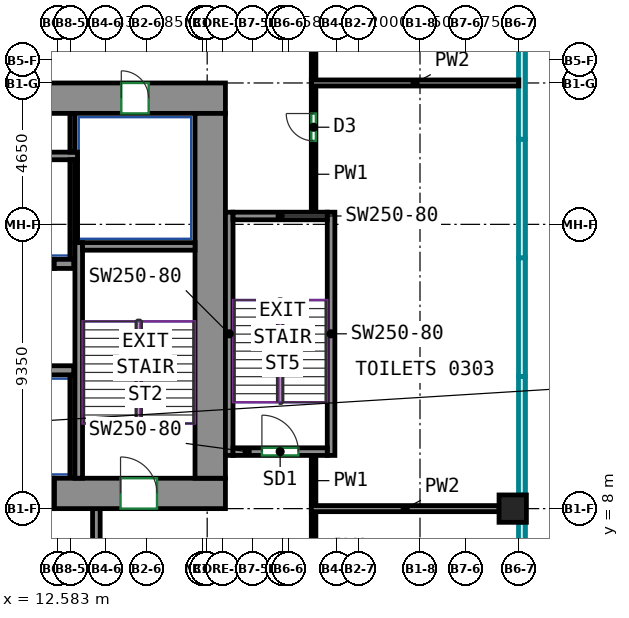
"""IFC4 building model, lengths in metres.
Left out: names, types, materials, properties, quantities, classifications, styles, units other than length and angle.
Written with IfcOpenShell. Run it as: python <this file> out.ifc"""

import sys

from ifc_helpers import new_model, si_unit, direction, frame, frame_2d, origin, origin_2d, place, context, subcontext, project, spatial, rectangle, extrude, source, transform, mapped, element, fill, save


model = new_model("IFC4")
c1 = context("Model", 3, precision=1e-05, world=origin(), true_north=direction((0.0, 1.0)))
c2 = subcontext(c1, "Body", "Model", "MODEL_VIEW")
j1 = project(units=[si_unit("LENGTHUNIT", "METRE"), si_unit("PLANEANGLEUNIT", "RADIAN")], contexts=[c1])
p1 = place(None, origin())
s1 = spatial("IfcSite", under=j1, at=p1, CompositionType="ELEMENT")
p2 = place(p1, origin())
s2 = spatial("IfcBuilding", under=s1, at=p2, CompositionType="ELEMENT")
p3 = place(p2, frame((0.0, 0.0, 18.0)))
s3 = spatial("IfcBuildingStorey", under=s2, at=p3, CompositionType="ELEMENT", Elevation=18.0)
m1 = source(origin(), c2, "Body", "SweptSolid", [
    extrude(rectangle(XDim=0.9, YDim=0.9, at=origin_2d()), origin(), (0.0, 0.0, 1.0), 4.1),
])
p4 = place(p3, frame((27.55, 8.0, 0.0), z_axis=(0.0, 0.0, 1.0), x_axis=(1.0, 0.0, 0.0)))
e1 = element("IfcColumn", 1, at=p4, inside=s3, PredefinedType="COLUMN", context=c2, shape_type="MappedRepresentation", body=[
    mapped(m1, transform((0.0, 0.0, 0.0))),
])
m2 = source(origin(), c2, "Body", "SweptSolid", [
    extrude(rectangle(XDim=5.63, YDim=1.0, at=frame_2d((2.815, 0.0))), origin(), (0.0, 0.0, 1.0), 4.1),
])
p5 = place(p3, frame((12.47, 8.5, 0.0), z_axis=(0.0, 0.0, 1.0), x_axis=(1.0, 0.0, 0.0)))
e2 = element("IfcWall", 2, at=p5, inside=s3, PredefinedType="SHEAR", context=c2, shape_type="MappedRepresentation", body=[
    mapped(m2, transform((0.0, 0.0, 0.0))),
])
p6 = place(p5, frame((2.18, 0.0, 0.0)))
e3 = element("IfcOpeningElement", 3, at=p6, cuts=e2, PredefinedType="OPENING", context=c2, shape_type="SweptSolid", body=[
    extrude(rectangle(XDim=1.2, YDim=2.1, at=frame_2d((0.6, 1.05))), frame((0.0, 0.51, 0.0), z_axis=(0.0, -1.0, 0.0), x_axis=(1.0, 0.0, 0.0)), (0.0, 0.0, 1.0), 1.02),
])
m3 = source(origin(), c2, "Body", "SweptSolid", [
    extrude(rectangle(XDim=34.1, YDim=1.0, at=frame_2d((17.05, 0.0))), origin(), (0.0, 0.0, 1.0), 4.1),
])
p7 = place(p3, frame((-16.0, 21.5, 0.0), z_axis=(0.0, 0.0, 1.0), x_axis=(1.0, 0.0, 0.0)))
e4 = element("IfcWall", 4, at=p7, inside=s3, PredefinedType="SHEAR", context=c2, shape_type="MappedRepresentation", body=[
    mapped(m3, transform((0.0, 0.0, 0.0))),
])
p8 = place(p7, frame((8.52, 0.0, 0.0)))
e5 = element("IfcOpeningElement", 5, at=p8, cuts=e4, PredefinedType="OPENING", context=c2, shape_type="SweptSolid", body=[
    extrude(rectangle(XDim=0.9, YDim=2.1, at=frame_2d((0.45, 1.05))), frame((0.0, 0.51, 0.0), z_axis=(0.0, -1.0, 0.0), x_axis=(1.0, 0.0, 0.0)), (0.0, 0.0, 1.0), 1.02),
])
p9 = place(p7, frame((14.55, 0.0, 0.0)))
e6 = element("IfcOpeningElement", 6, at=p9, cuts=e4, PredefinedType="OPENING", context=c2, shape_type="SweptSolid", body=[
    extrude(rectangle(XDim=0.9, YDim=2.1, at=frame_2d((0.45, 1.05))), frame((0.0, 0.51, 0.0), z_axis=(0.0, -1.0, 0.0), x_axis=(1.0, 0.0, 0.0)), (0.0, 0.0, 1.0), 1.02),
])
p10 = place(p7, frame((19.374, 0.0, 0.0)))
e7 = element("IfcOpeningElement", 7, at=p10, cuts=e4, PredefinedType="OPENING", context=c2, shape_type="SweptSolid", body=[
    extrude(rectangle(XDim=0.9, YDim=2.1, at=frame_2d((0.45, 1.05))), frame((0.0, 0.51, 0.0), z_axis=(0.0, -1.0, 0.0), x_axis=(1.0, 0.0, 0.0)), (0.0, 0.0, 1.0), 1.02),
])
p11 = place(p7, frame((25.404, 0.0, 0.0)))
e8 = element("IfcOpeningElement", 8, at=p11, cuts=e4, PredefinedType="OPENING", context=c2, shape_type="SweptSolid", body=[
    extrude(rectangle(XDim=0.9, YDim=2.1, at=frame_2d((0.45, 1.05))), frame((0.0, 0.51, 0.0), z_axis=(0.0, -1.0, 0.0), x_axis=(1.0, 0.0, 0.0)), (0.0, 0.0, 1.0), 1.02),
])
p12 = place(p7, frame((2.525, 0.0, 0.0)))
e9 = element("IfcOpeningElement", 9, at=p12, cuts=e4, PredefinedType="OPENING", context=c2, shape_type="SweptSolid", body=[
    extrude(rectangle(XDim=0.9, YDim=2.1, at=frame_2d((0.45, 1.05))), frame((0.0, 0.51, 0.0), z_axis=(0.0, -1.0, 0.0), x_axis=(1.0, 0.0, 0.0)), (0.0, 0.0, 1.0), 1.02),
])
p13 = place(p7, frame((30.675, 0.0, 0.0)))
e10 = element("IfcOpeningElement", 10, at=p13, cuts=e4, PredefinedType="OPENING", context=c2, shape_type="SweptSolid", body=[
    extrude(rectangle(XDim=0.9, YDim=2.1, at=frame_2d((0.45, 1.05))), frame((0.0, 0.51, 0.0), z_axis=(0.0, -1.0, 0.0), x_axis=(1.0, 0.0, 0.0)), (0.0, 0.0, 1.0), 1.02),
])
m4 = source(origin(), c2, "Body", "SweptSolid", [
    extrude(rectangle(XDim=12.0, YDim=1.0, at=frame_2d((6.0, 0.0))), origin(), (0.0, 0.0, 1.0), 4.1),
])
p14 = place(p3, frame((17.6, 9.0, 0.0), z_axis=(0.0, 0.0, 1.0), x_axis=(0.0, 1.0, 0.0)))
e11 = element("IfcWall", 11, at=p14, inside=s3, PredefinedType="SHEAR", context=c2, shape_type="MappedRepresentation", body=[
    mapped(m4, transform((0.0, 0.0, 0.0))),
])
m5 = source(origin(), c2, "Body", "SweptSolid", [
    extrude(rectangle(XDim=7.75, YDim=0.25, at=frame_2d((3.875, 0.0))), origin(), (0.0, 0.0, 1.0), 4.1),
])
p15 = place(p3, frame((13.275, 9.0, 0.0), z_axis=(0.0, 0.0, 1.0), x_axis=(0.0, 1.0, 0.0)))
e12 = element("IfcWall", 12, at=p15, inside=s3, PredefinedType="SHEAR", context=c2, shape_type="MappedRepresentation", body=[
    mapped(m5, transform((0.0, 0.0, 0.0))),
])
m6 = source(origin(), c2, "Body", "SweptSolid", [
    extrude(rectangle(XDim=3.7, YDim=0.25, at=frame_2d((1.85, 0.0))), origin(), (0.0, 0.0, 1.0), 4.1),
])
p16 = place(p3, frame((13.4, 16.625, 0.0), z_axis=(0.0, 0.0, 1.0), x_axis=(1.0, 0.0, 0.0)))
e13 = element("IfcWall", 13, at=p16, inside=s3, PredefinedType="SHEAR", context=c2, shape_type="MappedRepresentation", body=[
    mapped(m6, transform((0.0, 0.0, 0.0))),
])
m7 = source(origin(), c2, "Body", "SweptSolid", [
    extrude(rectangle(XDim=8.0, YDim=0.25, at=frame_2d((4.0, 0.0))), origin(), (0.0, 0.0, 1.0), 4.1),
])
for number, where, z_axis, x_axis in (
    (14, (18.225, 9.75, 0.0), (0.0, 0.0, 1.0), (0.0, 1.0, 0.0)),
    (15, (21.575, 9.75, 0.0), (0.0, 0.0, 1.0), (0.0, 1.0, 0.0)),
):
    element("IfcWall", number, at=place(p3, frame(where, z_axis=z_axis, x_axis=x_axis)), inside=s3, PredefinedType="SHEAR", context=c2, shape_type="MappedRepresentation", body=[
        mapped(m7, transform((0.0, 0.0, 0.0))),
    ])
m8 = source(origin(), c2, "Body", "SweptSolid", [
    extrude(rectangle(XDim=3.1, YDim=0.25, at=frame_2d((1.55, 0.0))), origin(), (0.0, 0.0, 1.0), 4.1),
])
p17 = place(p3, frame((18.35, 9.875, 0.0), z_axis=(0.0, 0.0, 1.0), x_axis=(1.0, 0.0, 0.0)))
e16 = element("IfcWall", 16, at=p17, inside=s3, PredefinedType="SHEAR", context=c2, shape_type="MappedRepresentation", body=[
    mapped(m8, transform((0.0, 0.0, 0.0))),
])
p18 = place(p17, frame((0.95, 0.0, 0.0)))
e17 = element("IfcOpeningElement", 17, at=p18, cuts=e16, PredefinedType="OPENING", context=c2, shape_type="SweptSolid", body=[
    extrude(rectangle(XDim=1.2, YDim=2.1, at=frame_2d((0.6, 1.05))), frame((0.0, 0.135, 0.0), z_axis=(0.0, -1.0, 0.0), x_axis=(1.0, 0.0, 0.0)), (0.0, 0.0, 1.0), 0.27),
])
p19 = place(p3, frame((18.35, 17.625, 0.0), z_axis=(0.0, 0.0, 1.0), x_axis=(1.0, 0.0, 0.0)))
e18 = element("IfcWall", 18, at=p19, inside=s3, PredefinedType="SHEAR", context=c2, shape_type="MappedRepresentation", body=[
    mapped(m8, transform((0.0, 0.0, 0.0))),
])
m9 = source(origin(), c2, "Body", "SweptSolid", [
    extrude(rectangle(XDim=2.82, YDim=0.3, at=frame_2d((1.41, 0.0))), origin(), (0.0, 0.0, 1.0), 4.1),
])
p20 = place(p3, frame((10.29, 12.55, 0.0), z_axis=(0.0, 0.0, 1.0), x_axis=(1.0, 0.0, 0.0)))
e19 = element("IfcWall", 19, at=p20, inside=s3, PredefinedType="SHEAR", context=c2, shape_type="MappedRepresentation", body=[
    mapped(m9, transform((0.0, 0.0, 0.0))),
])
m10 = source(origin(), c2, "Body", "SweptSolid", [
    extrude(rectangle(XDim=0.64, YDim=0.3, at=frame_2d((0.32, 0.0))), origin(), (0.0, 0.0, 1.0), 4.1),
])
p21 = place(p3, frame((12.47, 16.05, 0.0), z_axis=(0.0, 0.0, 1.0), x_axis=(1.0, 0.0, 0.0)))
e20 = element("IfcWall", 20, at=p21, inside=s3, PredefinedType="SHEAR", context=c2, shape_type="MappedRepresentation", body=[
    mapped(m10, transform((0.0, 0.0, 0.0))),
])
m11 = source(origin(), c2, "Body", "SweptSolid", [
    extrude(rectangle(XDim=1.4, YDim=0.3, at=frame_2d((0.7, 0.0))), origin(), (0.0, 0.0, 1.0), 4.1),
])
p22 = place(p3, frame((11.07, 16.05, 0.0), z_axis=(0.0, 0.0, 1.0), x_axis=(1.0, 0.0, 0.0)))
e21 = element("IfcWall", 21, at=p22, inside=s3, PredefinedType="PARTITIONING", context=c2, shape_type="MappedRepresentation", body=[
    mapped(m11, transform((0.0, 0.0, 0.0))),
])
p23 = place(p22, frame((0.15, 0.0, 0.0)))
e22 = element("IfcOpeningElement", 22, at=p23, cuts=e21, PredefinedType="OPENING", context=c2, shape_type="SweptSolid", body=[
    extrude(rectangle(XDim=1.1, YDim=2.1, at=frame_2d((0.55, 1.05))), frame((0.0, 0.16, 0.0), z_axis=(0.0, -1.0, 0.0), x_axis=(1.0, 0.0, 0.0)), (0.0, 0.0, 1.0), 0.32),
])
m12 = source(origin(), c2, "Body", "SweptSolid", [
    extrude(rectangle(XDim=2.65, YDim=0.25, at=frame_2d((1.325, 0.0))), origin(), (0.0, 0.0, 1.0), 4.1),
])
p24 = place(p3, frame((13.855, 5.35, 0.0), z_axis=(0.0, 0.0, 1.0), x_axis=(0.0, 1.0, 0.0)))
e23 = element("IfcWall", 23, at=p24, inside=s3, PredefinedType="PARTITIONING", context=c2, shape_type="MappedRepresentation", body=[
    mapped(m12, transform((0.0, 0.0, 0.0))),
])
m13 = source(origin(), c2, "Body", "SweptSolid", [
    extrude(rectangle(XDim=24.37, YDim=0.25, at=frame_2d((12.185, 0.0))), origin(), (0.0, 0.0, 1.0), 4.1),
])
p25 = place(p3, frame((-11.135, 19.6, 0.0), z_axis=(0.0, 0.0, 1.0), x_axis=(1.0, 0.0, 0.0)))
e24 = element("IfcWall", 24, at=p25, inside=s3, PredefinedType="PARTITIONING", context=c2, shape_type="MappedRepresentation", body=[
    mapped(m13, transform((0.0, 0.0, 0.0))),
])
m14 = source(origin(), c2, "Body", "SweptSolid", [
    extrude(rectangle(XDim=3.275, YDim=0.165, at=frame_2d((1.638, 0.0))), origin(), (0.0, 0.0, 1.0), 4.1),
])
p26 = place(p3, frame((13.067, 16.2, 0.0), z_axis=(0.0, 0.0, 1.0), x_axis=(0.0, 1.0, 0.0)))
e25 = element("IfcWall", 25, at=p26, inside=s3, PredefinedType="PARTITIONING", context=c2, shape_type="MappedRepresentation", body=[
    mapped(m14, transform((0.0, 0.0, 0.0))),
])
m15 = source(origin(), c2, "Body", "SweptSolid", [
    extrude(rectangle(XDim=1.275, YDim=0.165, at=frame_2d((0.637, 0.0))), origin(), (0.0, 0.0, 1.0), 4.1),
])
p27 = place(p3, frame((13.067, 19.725, 0.0), z_axis=(0.0, 0.0, 1.0), x_axis=(0.0, 1.0, 0.0)))
e26 = element("IfcWall", 26, at=p27, inside=s3, PredefinedType="PARTITIONING", context=c2, shape_type="MappedRepresentation", body=[
    mapped(m15, transform((0.0, 0.0, 0.0))),
])
m16 = source(origin(), c2, "Body", "SweptSolid", [
    extrude(rectangle(XDim=2.725, YDim=0.085, at=frame_2d((1.363, 0.0))), origin(), (0.0, 0.0, 1.0), 4.1),
])
p28 = place(p3, frame((13.192, 16.75, 0.0), z_axis=(0.0, 0.0, 1.0), x_axis=(0.0, 1.0, 0.0)))
e27 = element("IfcWall", 27, at=p28, inside=s3, PredefinedType="PARTITIONING", context=c2, shape_type="MappedRepresentation", body=[
    mapped(m16, transform((0.0, 0.0, 0.0))),
])
m17 = source(origin(), c2, "Body", "SweptSolid", [
    extrude(rectangle(XDim=3.4, YDim=0.165, at=frame_2d((1.7, 0.0))), origin(), (0.0, 0.0, 1.0), 4.1),
])
p29 = place(p3, frame((13.067, 9.0, 0.0), z_axis=(0.0, 0.0, 1.0), x_axis=(0.0, 1.0, 0.0)))
e28 = element("IfcWall", 28, at=p29, inside=s3, PredefinedType="PARTITIONING", context=c2, shape_type="MappedRepresentation", body=[
    mapped(m17, transform((0.0, 0.0, 0.0))),
])
m18 = source(origin(), c2, "Body", "SweptSolid", [
    extrude(rectangle(XDim=1.4, YDim=1.0, at=frame_2d((0.7, 0.0))), origin(), (0.0, 0.0, 1.0), 2.7),
])
p30 = place(p3, frame((11.07, 8.5, 0.0), z_axis=(0.0, 0.0, 1.0), x_axis=(1.0, 0.0, 0.0)))
e29 = element("IfcWall", 29, at=p30, inside=s3, PredefinedType="PARTITIONING", context=c2, shape_type="MappedRepresentation", body=[
    mapped(m18, transform((0.0, 0.0, 0.0))),
])
p31 = place(p30, frame((0.25, 0.0, 0.0)))
e30 = element("IfcOpeningElement", 30, at=p31, cuts=e29, PredefinedType="OPENING", context=c2, shape_type="SweptSolid", body=[
    extrude(rectangle(XDim=0.9, YDim=2.1, at=frame_2d((0.45, 1.05))), frame((0.0, 0.51, 0.0), z_axis=(0.0, -1.0, 0.0), x_axis=(1.0, 0.0, 0.0)), (0.0, 0.0, 1.0), 1.02),
])
p32 = place(p3, frame((21.0, 5.6, 0.0), z_axis=(0.0, 0.0, 1.0), x_axis=(0.0, 1.0, 0.0)))
e31 = element("IfcWall", 31, at=p32, inside=s3, PredefinedType="PARTITIONING", context=c2, shape_type="SweptSolid", body=[
    extrude(rectangle(XDim=2.31, YDim=0.15, at=frame_2d((1.155, 0.0))), origin(), (0.0, 0.0, 1.0), 4.1),
])
p33 = place(p3, frame((21.0, 17.75, 0.0), z_axis=(0.0, 0.0, 1.0), x_axis=(0.0, 1.0, 0.0)))
e32 = element("IfcWall", 32, at=p33, inside=s3, PredefinedType="PARTITIONING", context=c2, shape_type="SweptSolid", body=[
    extrude(rectangle(XDim=4.16, YDim=0.15, at=frame_2d((2.08, 0.0))), origin(), (0.0, 0.0, 1.0), 4.1),
])
p34 = place(p33, frame((2.345, 0.0, 0.0)))
e33 = element("IfcOpeningElement", 33, at=p34, cuts=e32, PredefinedType="OPENING", context=c2, shape_type="SweptSolid", body=[
    extrude(rectangle(XDim=0.9, YDim=2.1, at=frame_2d((0.45, 1.05))), frame((0.0, 0.085, 0.0), z_axis=(0.0, -1.0, 0.0), x_axis=(1.0, 0.0, 0.0)), (0.0, 0.0, 1.0), 0.17),
])
p35 = place(p3, frame((21.0, 8.09, 0.0), z_axis=(0.0, 0.0, 1.0), x_axis=(0.0, 1.0, 0.0)))
e34 = element("IfcWall", 34, at=p35, inside=s3, PredefinedType="PARTITIONING", context=c2, shape_type="SweptSolid", body=[
    extrude(rectangle(XDim=1.66, YDim=0.15, at=frame_2d((0.83, 0.0))), origin(), (0.0, 0.0, 1.0), 4.1),
])
p36 = place(p3, frame((21.0, 22.09, 0.0), z_axis=(0.0, 0.0, 1.0), x_axis=(0.0, 1.0, 0.0)))
e35 = element("IfcWall", 35, at=p36, inside=s3, PredefinedType="PARTITIONING", context=c2, shape_type="SweptSolid", body=[
    extrude(rectangle(XDim=2.335, YDim=0.15, at=frame_2d((1.167, 0.0))), origin(), (0.0, 0.0, 1.0), 4.1),
])
p37 = place(p3, frame((20.926, 8.0, 0.0), z_axis=(0.0, 0.0, 1.0), x_axis=(1.0, 0.0, 0.0)))
e36 = element("IfcWall", 36, at=p37, inside=s3, PredefinedType="PARTITIONING", context=c2, shape_type="SweptSolid", body=[
    extrude(rectangle(XDim=6.174, YDim=0.2, at=frame_2d((3.087, 0.0))), origin(), (0.0, 0.0, 1.0), 4.1),
])
p38 = place(p3, frame((27.75, 22.0, 0.0), z_axis=(0.0, 0.0, 1.0), x_axis=(-1.0, 0.0, 0.0)))
e37 = element("IfcWall", 37, at=p38, inside=s3, PredefinedType="PARTITIONING", context=c2, shape_type="SweptSolid", body=[
    extrude(rectangle(XDim=6.824, YDim=0.2, at=frame_2d((3.412, 0.0))), origin(), (0.0, 0.0, 1.0), 4.1),
])
p39 = place(p13, origin())
e38 = element("IfcDoor", 38, at=p39, inside=s3, OperationType="SINGLE_SWING_LEFT", PredefinedType="DOOR", context=c2, shape_type="SweptSolid", body=[
    extrude(rectangle(XDim=0.9, YDim=2.1, at=frame_2d((0.45, 1.05))), frame((0.0, -0.355, 0.0), z_axis=(0.0, -1.0, 0.0), x_axis=(1.0, 0.0, 0.0)), (0.0, 0.0, 1.0), 0.05),
])
fill(e10, e38)
p40 = place(p6, origin())
e39 = element("IfcDoor", 39, at=p40, inside=s3, OperationType="DOUBLE_DOOR_SINGLE_SWING", PredefinedType="DOOR", context=c2, shape_type="SweptSolid", body=[
    extrude(rectangle(XDim=1.2, YDim=2.1, at=frame_2d((0.6, 1.05))), frame((0.0, 0.405, 0.0), z_axis=(0.0, -1.0, 0.0), x_axis=(1.0, 0.0, 0.0)), (0.0, 0.0, 1.0), 0.05),
])
fill(e3, e39)
p41 = place(p18, origin())
e40 = element("IfcDoor", 40, at=p41, inside=s3, OperationType="DOUBLE_DOOR_SINGLE_SWING", PredefinedType="DOOR", context=c2, shape_type="SweptSolid", body=[
    extrude(rectangle(XDim=1.2, YDim=2.1, at=frame_2d((0.6, 1.05))), frame((0.0, 0.025, 0.0), z_axis=(0.0, -1.0, 0.0), x_axis=(1.0, 0.0, 0.0)), (0.0, 0.0, 1.0), 0.05),
])
fill(e17, e40)
p42 = place(p34, origin())
e41 = element("IfcDoor", 41, at=p42, inside=s3, OperationType="SINGLE_SWING_RIGHT", PredefinedType="DOOR", context=c2, shape_type="SweptSolid", body=[
    extrude(rectangle(XDim=0.9, YDim=2.1, at=frame_2d((0.45, 1.05))), frame((0.0, 0.025, 0.0), z_axis=(0.0, -1.0, 0.0), x_axis=(1.0, 0.0, 0.0)), (0.0, 0.0, 1.0), 0.05),
])
fill(e33, e41)
save(model, sys.argv[1])
